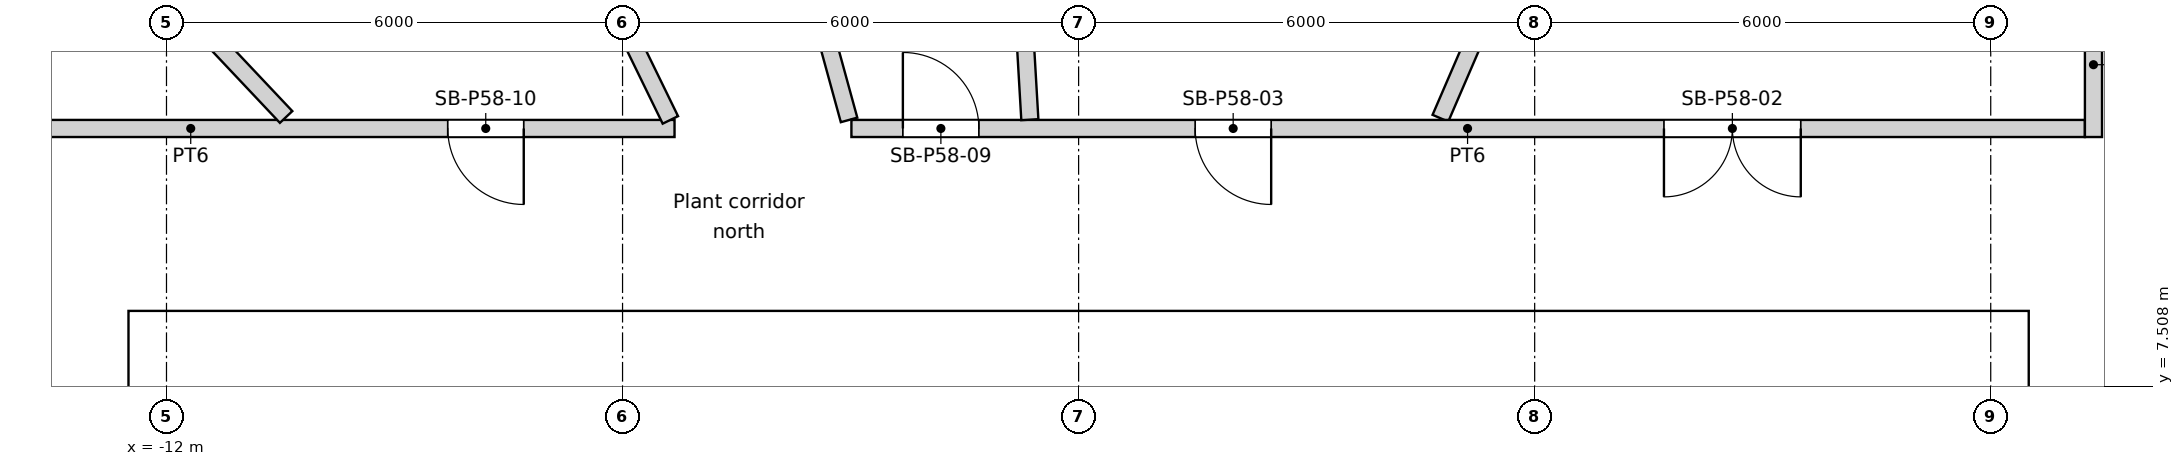
"""IFC4 building model, lengths in metres.
Left out: names, types, materials, properties, quantities, classifications, styles, units other than length and angle.
Written with IfcOpenShell. Run it as: python <this file> out.ifc"""

import sys

from ifc_helpers import new_model, si_unit, direction, frame, frame_2d, origin, place, context, subcontext, project, spatial, rectangle, extrude, element, fill, save


model = new_model("IFC4")
c1 = context("Model", 3, precision=1e-05, world=origin(), true_north=direction((0.0, 1.0)))
c2 = subcontext(c1, "Body", "Model", "MODEL_VIEW")
j1 = project(units=[si_unit("LENGTHUNIT", "METRE"), si_unit("PLANEANGLEUNIT", "RADIAN")], contexts=[c1])
p1 = place(None, origin())
s1 = spatial("IfcSite", under=j1, at=p1, CompositionType="ELEMENT")
p2 = place(p1, origin())
s2 = spatial("IfcBuilding", under=s1, at=p2, CompositionType="ELEMENT")
p3 = place(p2, frame((0.0, 0.0, 225.0)))
s3 = spatial("IfcBuildingStorey", under=s2, at=p3, CompositionType="ELEMENT", Elevation=225.0)
p4 = place(p3, frame((-12.5, 8.05, 0.0), z_axis=(0.0, 0.0, 1.0), x_axis=(1.0, 0.0, 0.0)))
e1 = element("IfcWall", 1, at=p4, inside=s3, PredefinedType="SOLIDWALL", context=c2, shape_type="SweptSolid", body=[
    extrude(rectangle(XDim=25.0, YDim=0.9, at=frame_2d((12.5, 0.0))), origin(), (0.0, 0.0, 1.0), 5.65),
])
p5 = place(p4, frame((8.3, 0.0, 0.0)))
e2 = element("IfcOpeningElement", 2, at=p5, cuts=e1, PredefinedType="OPENING", context=c2, shape_type="SweptSolid", body=[
    extrude(rectangle(XDim=1.8, YDim=2.1, at=frame_2d((0.9, 1.05))), frame((0.0, 0.45, 0.0), z_axis=(0.0, -1.0, 0.0), x_axis=(1.0, 0.0, 0.0)), (0.0, 0.0, 1.0), 0.9),
])
p6 = place(p3, frame((-12.05, -7.6, 0.0), z_axis=(0.0, 0.0, 1.0), x_axis=(0.0, 1.0, 0.0)))
e3 = element("IfcWall", 3, at=p6, inside=s3, PredefinedType="SOLIDWALL", context=c2, shape_type="SweptSolid", body=[
    extrude(rectangle(XDim=15.2, YDim=0.9, at=frame_2d((7.6, 0.0))), origin(), (0.0, 0.0, 1.0), 5.65),
])
p7 = place(p6, frame((7.1, 0.0, 0.0)))
e4 = element("IfcOpeningElement", 4, at=p7, cuts=e3, PredefinedType="OPENING", context=c2, shape_type="SweptSolid", body=[
    extrude(rectangle(XDim=1.0, YDim=2.1, at=frame_2d((0.5, 1.05))), frame((0.0, 0.45, 0.0), z_axis=(0.0, -1.0, 0.0), x_axis=(1.0, 0.0, 0.0)), (0.0, 0.0, 1.0), 0.9),
])
p8 = place(p3, frame((12.05, -7.6, 0.0), z_axis=(0.0, 0.0, 1.0), x_axis=(0.0, 1.0, 0.0)))
e5 = element("IfcWall", 5, at=p8, inside=s3, PredefinedType="SOLIDWALL", context=c2, shape_type="SweptSolid", body=[
    extrude(rectangle(XDim=15.2, YDim=0.9, at=frame_2d((7.6, 0.0))), origin(), (0.0, 0.0, 1.0), 5.65),
])
p9 = place(p8, frame((5.1, 0.0, 0.0)))
e6 = element("IfcOpeningElement", 6, at=p9, cuts=e5, PredefinedType="OPENING", context=c2, shape_type="SweptSolid", body=[
    extrude(rectangle(XDim=1.0, YDim=2.1, at=frame_2d((0.5, 1.05))), frame((0.0, 0.45, 0.0), z_axis=(0.0, -1.0, 0.0), x_axis=(1.0, 0.0, 0.0)), (0.0, 0.0, 1.0), 0.9),
])
for number, where, z_axis, x_axis in (
    (7, (-2.25, 3.25, 0.0), (0.0, 0.0, 1.0), (0.0, 1.0, 0.0)),
    (8, (0.55, 3.25, 0.0), (0.0, 0.0, 1.0), (0.0, 1.0, 0.0)),
):
    element("IfcWall", number, at=place(p3, frame(where, z_axis=z_axis, x_axis=x_axis)), inside=s3, PredefinedType="SOLIDWALL", context=c2, shape_type="SweptSolid", body=[
        extrude(rectangle(XDim=4.35, YDim=0.3, at=frame_2d((2.175, 0.0))), origin(), (0.0, 0.0, 1.0), 5.65),
    ])
p10 = place(p3, frame((-9.05, -7.0, 0.0), z_axis=(0.0, 0.0, 1.0), x_axis=(0.0, 1.0, 0.0)))
e9 = element("IfcWall", 9, at=p10, inside=s3, PredefinedType="SOLIDWALL", context=c2, shape_type="SweptSolid", body=[
    extrude(rectangle(XDim=14.6, YDim=0.3, at=frame_2d((7.3, 0.0))), origin(), (0.0, 0.0, 1.0), 5.65),
])
p11 = place(p3, frame((-4.275, 6.7, 0.0), z_axis=(0.0, 0.0, 1.0), x_axis=(0.0, 1.0, 0.0)))
e10 = element("IfcWall", 10, at=p11, inside=s3, PredefinedType="SOLIDWALL", context=c2, shape_type="SweptSolid", body=[
    extrude(rectangle(XDim=0.9, YDim=0.15, at=frame_2d((0.45, 0.0))), origin(), (0.0, 0.0, 1.0), 5.65),
])
p12 = place(p3, frame((0.7, 7.15, 0.0), z_axis=(0.0, 0.0, 1.0), x_axis=(1.0, 0.0, 0.0)))
e11 = element("IfcWall", 11, at=p12, inside=s3, PredefinedType="SOLIDWALL", context=c2, shape_type="SweptSolid", body=[
    extrude(rectangle(XDim=8.35, YDim=0.9, at=frame_2d((4.175, 0.0))), origin(), (0.0, 0.0, 1.0), 5.65),
])
p13 = place(p3, frame((-17.497, 18.546, 0.0), z_axis=(0.0, 0.0, 1.0), x_axis=(0.686241478279, -0.727373792138, 0.0)))
e12 = element("IfcWall", 12, at=p13, inside=s3, PredefinedType="PARTITIONING", context=c2, shape_type="SweptSolid", body=[
    extrude(rectangle(XDim=10.304, YDim=0.225, at=frame_2d((5.152, 0.0))), origin(), (0.0, 0.0, 1.0), 2.7),
])
p14 = place(p3, frame((-9.575, 19.633, 0.0), z_axis=(0.0, 0.0, 1.0), x_axis=(0.438353415496, -0.898802694212, 0.0)))
e13 = element("IfcWall", 13, at=p14, inside=s3, PredefinedType="PARTITIONING", context=c2, shape_type="SweptSolid", body=[
    extrude(rectangle(XDim=9.591, YDim=0.225, at=frame_2d((4.795, 0.0))), origin(), (0.0, 0.0, 1.0), 5.2),
])
p15 = place(p3, frame((-5.78, 21.077, 0.0), z_axis=(0.0, 0.0, 1.0), x_axis=(0.264447382595, -0.964400115014, 0.0)))
e14 = element("IfcWall", 14, at=p15, inside=s3, PredefinedType="PARTITIONING", context=c2, shape_type="SweptSolid", body=[
    extrude(rectangle(XDim=10.436, YDim=0.225, at=frame_2d((5.218, 0.0))), origin(), (0.0, 0.0, 1.0), 5.2),
])
p16 = place(p3, frame((-5.316, 10.9, 0.0), z_axis=(0.0, 0.0, 1.0), x_axis=(-1.0, 0.0, 0.0)))
e15 = element("IfcWall", 15, at=p16, inside=s3, PredefinedType="PARTITIONING", context=c2, shape_type="SweptSolid", body=[
    extrude(rectangle(XDim=9.696, YDim=0.225, at=frame_2d((4.848, 0.0))), origin(), (0.0, 0.0, 1.0), 5.2),
])
p17 = place(p16, frame((1.984, 0.0, 0.0)))
e16 = element("IfcOpeningElement", 16, at=p17, cuts=e15, PredefinedType="OPENING", context=c2, shape_type="SweptSolid", body=[
    extrude(rectangle(XDim=1.0, YDim=2.1, at=frame_2d((0.5, 1.05))), frame((0.0, 0.113, 0.0), z_axis=(0.0, -1.0, 0.0), x_axis=(1.0, 0.0, 0.0)), (0.0, 0.0, 1.0), 0.225),
])
p18 = place(p3, frame((-1.482, 25.454, 0.0), z_axis=(0.0, 0.0, 1.0), x_axis=(0.058137182414, -0.9983086036, 0.0)))
e17 = element("IfcWall", 17, at=p18, inside=s3, PredefinedType="PARTITIONING", context=c2, shape_type="SweptSolid", body=[
    extrude(rectangle(XDim=14.463, YDim=0.225, at=frame_2d((7.231, 0.0))), origin(), (0.0, 0.0, 1.0), 2.7),
])
p19 = place(p3, frame((10.099, 23.412, 0.0), z_axis=(0.0, 0.0, 1.0), x_axis=(-0.396077936738, -0.918216895961, 0.0)))
e18 = element("IfcWall", 18, at=p19, inside=s3, PredefinedType="PARTITIONING", context=c2, shape_type="SweptSolid", body=[
    extrude(rectangle(XDim=13.479, YDim=0.225, at=frame_2d((6.74, 0.0))), origin(), (0.0, 0.0, 1.0), 5.2),
])
p20 = place(p3, frame((13.239, 10.9, 0.0), z_axis=(0.0, 0.0, 1.0), x_axis=(-1.0, 0.0, 0.0)))
e19 = element("IfcWall", 19, at=p20, inside=s3, PredefinedType="PARTITIONING", context=c2, shape_type="SweptSolid", body=[
    extrude(rectangle(XDim=16.228, YDim=0.225, at=frame_2d((8.114, 0.0))), origin(), (0.0, 0.0, 1.0), 5.2),
])
p21 = place(p20, frame((3.738, 0.0, 0.0)))
e20 = element("IfcOpeningElement", 20, at=p21, cuts=e19, PredefinedType="OPENING", context=c2, shape_type="SweptSolid", body=[
    extrude(rectangle(XDim=1.8, YDim=2.4, at=frame_2d((0.9, 1.2))), frame((0.0, 0.113, 0.0), z_axis=(0.0, -1.0, 0.0), x_axis=(1.0, 0.0, 0.0)), (0.0, 0.0, 1.0), 0.225),
])
p22 = place(p20, frame((10.706, 0.0, 0.0)))
e21 = element("IfcOpeningElement", 21, at=p22, cuts=e19, PredefinedType="OPENING", context=c2, shape_type="SweptSolid", body=[
    extrude(rectangle(XDim=1.0, YDim=2.1, at=frame_2d((0.5, 1.05))), frame((0.0, 0.113, 0.0), z_axis=(0.0, -1.0, 0.0), x_axis=(1.0, 0.0, 0.0)), (0.0, 0.0, 1.0), 0.225),
])
p23 = place(p20, frame((14.551, 0.0, 0.0)))
e22 = element("IfcOpeningElement", 22, at=p23, cuts=e19, PredefinedType="OPENING", context=c2, shape_type="SweptSolid", body=[
    extrude(rectangle(XDim=1.0, YDim=2.1, at=frame_2d((0.5, 1.05))), frame((0.0, 0.113, 0.0), z_axis=(0.0, -1.0, 0.0), x_axis=(1.0, 0.0, 0.0)), (0.0, 0.0, 1.0), 0.225),
])
p24 = place(p3, frame((13.352, 12.69, 0.0), z_axis=(0.0, 0.0, 1.0), x_axis=(0.0, -1.0, 0.0)))
e23 = element("IfcWall", 23, at=p24, inside=s3, PredefinedType="PARTITIONING", context=c2, shape_type="SweptSolid", body=[
    extrude(rectangle(XDim=1.903, YDim=0.225, at=frame_2d((0.951, 0.0))), origin(), (0.0, 0.0, 1.0), 5.2),
])
p25 = place(p5, origin())
e24 = element("IfcDoor", 24, at=p25, inside=s3, OperationType="DOUBLE_DOOR_SINGLE_SWING", PredefinedType="DOOR", context=c2, shape_type="SweptSolid", body=[
    extrude(rectangle(XDim=1.8, YDim=2.1, at=frame_2d((0.9, 1.05))), frame((0.0, 0.025, 0.0), z_axis=(0.0, -1.0, 0.0), x_axis=(1.0, 0.0, 0.0)), (0.0, 0.0, 1.0), 0.05),
])
fill(e2, e24)
p26 = place(p21, origin())
e25 = element("IfcDoor", 25, at=p26, inside=s3, OperationType="DOUBLE_DOOR_SINGLE_SWING", PredefinedType="DOOR", context=c2, shape_type="SweptSolid", body=[
    extrude(rectangle(XDim=1.8, YDim=2.4, at=frame_2d((0.9, 1.2))), frame((0.0, 0.025, 0.0), z_axis=(0.0, -1.0, 0.0), x_axis=(1.0, 0.0, 0.0)), (0.0, 0.0, 1.0), 0.05),
])
fill(e20, e25)
p27 = place(p22, origin())
e26 = element("IfcDoor", 26, at=p27, inside=s3, OperationType="SINGLE_SWING_LEFT", PredefinedType="DOOR", context=c2, shape_type="SweptSolid", body=[
    extrude(rectangle(XDim=1.0, YDim=2.1, at=frame_2d((0.5, 1.05))), frame((0.0, 0.025, 0.0), z_axis=(0.0, -1.0, 0.0), x_axis=(1.0, 0.0, 0.0)), (0.0, 0.0, 1.0), 0.05),
])
fill(e21, e26)
p28 = place(p23, origin())
e27 = element("IfcDoor", 27, at=p28, inside=s3, OperationType="SINGLE_SWING_LEFT", PredefinedType="DOOR", context=c2, shape_type="SweptSolid", body=[
    extrude(rectangle(XDim=1.0, YDim=2.1, at=frame_2d((0.5, 1.05))), frame((0.0, 0.025, 0.0), z_axis=(0.0, -1.0, 0.0), x_axis=(1.0, 0.0, 0.0)), (0.0, 0.0, 1.0), 0.05),
])
fill(e22, e27)
p29 = place(p17, origin())
e28 = element("IfcDoor", 28, at=p29, inside=s3, OperationType="SINGLE_SWING_LEFT", PredefinedType="DOOR", context=c2, shape_type="SweptSolid", body=[
    extrude(rectangle(XDim=1.0, YDim=2.1, at=frame_2d((0.5, 1.05))), frame((0.0, 0.025, 0.0), z_axis=(0.0, -1.0, 0.0), x_axis=(1.0, 0.0, 0.0)), (0.0, 0.0, 1.0), 0.05),
])
fill(e16, e28)
save(model, sys.argv[1])
